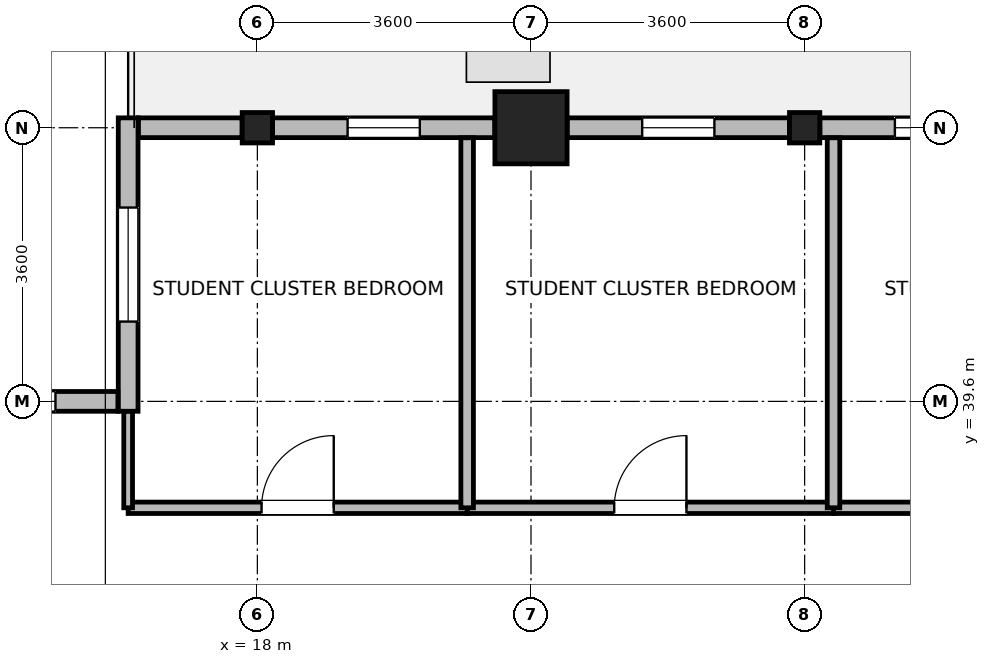
"""IFC4 building model, lengths in metres.
Left out: names, types, materials, properties, quantities, classifications, styles, units other than length and angle.
Written with IfcOpenShell. Run it as: python <this file> out.ifc"""

import sys

from ifc_helpers import new_model, si_unit, direction, frame, frame_2d, origin, origin_2d, place, context, subcontext, project, spatial, rectangle, i_section, extrude, source, transform, mapped, element, fill, save


model = new_model("IFC4")
c1 = context("Model", 3, precision=1e-05, world=origin(), true_north=direction((0.0, 1.0)))
c2 = subcontext(c1, "Body", "Model", "MODEL_VIEW")
j1 = project(units=[si_unit("LENGTHUNIT", "METRE"), si_unit("PLANEANGLEUNIT", "RADIAN")], contexts=[c1])
p1 = place(None, origin())
s1 = spatial("IfcSite", under=j1, at=p1, CompositionType="ELEMENT")
p2 = place(p1, origin())
s2 = spatial("IfcBuilding", under=s1, at=p2, CompositionType="ELEMENT")
p3 = place(p2, frame((0.0, 0.0, 231.4)))
s3 = spatial("IfcBuildingStorey", under=s2, at=p3, CompositionType="ELEMENT", Elevation=231.4)
m1 = source(origin(), c2, "Body", "SweptSolid", [
    extrude(rectangle(XDim=0.95, YDim=0.95, at=origin_2d()), origin(), (0.0, 0.0, 1.0), 3.7),
])
p4 = place(p3, frame((21.6, 43.2, 0.0), z_axis=(0.0, 0.0, 1.0), x_axis=(1.0, 0.0, 0.0)))
e1 = element("IfcColumn", 1, at=p4, inside=s3, PredefinedType="COLUMN", context=c2, shape_type="MappedRepresentation", body=[
    mapped(m1, transform((0.0, 0.0, 0.0), x_axis=(1.0, 0.0, 0.0), y_axis=(0.0, 1.0, 0.0), z_axis=(0.0, 0.0, 1.0), scale=1.0)),
])
m2 = source(origin(), c2, "Body", "SweptSolid", [
    extrude(i_section(OverallWidth=0.399, OverallDepth=0.4, WebThickness=0.017, FlangeThickness=0.023, FilletRadius=0.015, at=origin_2d()), origin(), (0.0, 0.0, 1.0), 3.7),
])
for number, where, z_axis, x_axis in (
    (2, (18.0, 43.2, 0.0), (0.0, 0.0, 1.0), (1.0, 0.0, 0.0)),
    (3, (25.2, 43.2, 0.0), (0.0, 0.0, 1.0), (1.0, 0.0, 0.0)),
):
    element("IfcColumn", number, at=place(p3, frame(where, z_axis=z_axis, x_axis=x_axis)), inside=s3, PredefinedType="COLUMN", context=c2, shape_type="MappedRepresentation", body=[
        mapped(m2, transform((0.0, 0.0, 0.0), x_axis=(1.0, 0.0, 0.0), y_axis=(0.0, 1.0, 0.0), z_axis=(0.0, 0.0, 1.0), scale=1.0)),
    ])
p5 = place(p3, frame((25.4, 43.2, 0.0), z_axis=(0.0, 0.0, 1.0), x_axis=(1.0, 0.0, 0.0)))
e4 = element("IfcWall", 4, at=p5, inside=s3, PredefinedType="STANDARD", context=c2, shape_type="SweptSolid", body=[
    extrude(rectangle(XDim=2.924, YDim=0.26, at=frame_2d((1.462, 0.0))), origin(), (0.0, 0.0, 1.0), 3.02),
])
p6 = place(p5, frame((0.987, 0.0, 0.85)))
e5 = element("IfcOpeningElement", 5, at=p6, cuts=e4, PredefinedType="OPENING", context=c2, shape_type="SweptSolid", body=[
    extrude(rectangle(XDim=0.95, YDim=1.75, at=frame_2d((0.475, 0.875))), frame((0.0, 0.14, 0.0), z_axis=(0.0, -1.0, 0.0), x_axis=(1.0, 0.0, 0.0)), (0.0, 0.0, 1.0), 0.28),
])
p7 = place(p3, frame((22.076, 43.2, 0.0), z_axis=(0.0, 0.0, 1.0), x_axis=(1.0, 0.0, 0.0)))
e6 = element("IfcWall", 6, at=p7, inside=s3, PredefinedType="STANDARD", context=c2, shape_type="SweptSolid", body=[
    extrude(rectangle(XDim=2.924, YDim=0.26, at=frame_2d((1.462, 0.0))), origin(), (0.0, 0.0, 1.0), 3.02),
])
p8 = place(p7, frame((0.987, 0.0, 0.85)))
e7 = element("IfcOpeningElement", 7, at=p8, cuts=e6, PredefinedType="OPENING", context=c2, shape_type="SweptSolid", body=[
    extrude(rectangle(XDim=0.95, YDim=1.75, at=frame_2d((0.475, 0.875))), frame((0.0, 0.14, 0.0), z_axis=(0.0, -1.0, 0.0), x_axis=(1.0, 0.0, 0.0)), (0.0, 0.0, 1.0), 0.28),
])
p9 = place(p3, frame((18.2, 43.2, 0.0), z_axis=(0.0, 0.0, 1.0), x_axis=(1.0, 0.0, 0.0)))
e8 = element("IfcWall", 8, at=p9, inside=s3, PredefinedType="STANDARD", context=c2, shape_type="SweptSolid", body=[
    extrude(rectangle(XDim=2.924, YDim=0.26, at=frame_2d((1.462, 0.0))), origin(), (0.0, 0.0, 1.0), 3.02),
])
p10 = place(p9, frame((0.987, 0.0, 0.85)))
e9 = element("IfcOpeningElement", 9, at=p10, cuts=e8, PredefinedType="OPENING", context=c2, shape_type="SweptSolid", body=[
    extrude(rectangle(XDim=0.95, YDim=1.75, at=frame_2d((0.475, 0.875))), frame((0.0, 0.14, 0.0), z_axis=(0.0, -1.0, 0.0), x_axis=(1.0, 0.0, 0.0)), (0.0, 0.0, 1.0), 0.28),
])
p11 = place(p3, frame((16.435, 43.2, 0.0), z_axis=(0.0, 0.0, 1.0), x_axis=(1.0, 0.0, 0.0)))
e10 = element("IfcWall", 10, at=p11, inside=s3, PredefinedType="STANDARD", context=c2, shape_type="SweptSolid", body=[
    extrude(rectangle(XDim=1.365, YDim=0.26, at=frame_2d((0.682, 0.0))), origin(), (0.0, 0.0, 1.0), 3.02),
])
p12 = place(p3, frame((16.3, 39.47, 0.0), z_axis=(0.0, 0.0, 1.0), x_axis=(0.0, 1.0, 0.0)))
e11 = element("IfcWall", 11, at=p12, inside=s3, PredefinedType="STANDARD", context=c2, shape_type="SweptSolid", body=[
    extrude(rectangle(XDim=3.86, YDim=0.26, at=frame_2d((1.93, 0.0))), origin(), (0.0, 0.0, 1.0), 3.42),
])
p13 = place(p12, frame((1.18, 0.0, 0.85)))
e12 = element("IfcOpeningElement", 12, at=p13, cuts=e11, PredefinedType="OPENING", context=c2, shape_type="SweptSolid", body=[
    extrude(rectangle(XDim=1.5, YDim=1.85, at=frame_2d((0.75, 0.925))), frame((0.0, 0.14, 0.0), z_axis=(0.0, -1.0, 0.0), x_axis=(1.0, 0.0, 0.0)), (0.0, 0.0, 1.0), 0.28),
])
p14 = place(p3, frame((6.737, 39.6, 0.0), z_axis=(0.0, 0.0, 1.0), x_axis=(1.0, 0.0, 0.0)))
e13 = element("IfcWall", 13, at=p14, inside=s3, PredefinedType="STANDARD", context=c2, shape_type="SweptSolid", body=[
    extrude(rectangle(XDim=9.428, YDim=0.26, at=frame_2d((4.714, 0.0))), origin(), (0.0, 0.0, 1.0), 3.42),
])
p15 = place(p14, frame((0.821, 0.0, 0.85)))
e14 = element("IfcOpeningElement", 14, at=p15, cuts=e13, PredefinedType="OPENING", context=c2, shape_type="SweptSolid", body=[
    extrude(rectangle(XDim=1.5, YDim=1.85, at=frame_2d((0.75, 0.925))), frame((0.0, 0.14, 0.0), z_axis=(0.0, -1.0, 0.0), x_axis=(1.0, 0.0, 0.0)), (0.0, 0.0, 1.0), 0.28),
])
p16 = place(p14, frame((3.964, 0.0, 0.85)))
e15 = element("IfcOpeningElement", 15, at=p16, cuts=e13, PredefinedType="OPENING", context=c2, shape_type="SweptSolid", body=[
    extrude(rectangle(XDim=1.5, YDim=1.85, at=frame_2d((0.75, 0.925))), frame((0.0, 0.14, 0.0), z_axis=(0.0, -1.0, 0.0), x_axis=(1.0, 0.0, 0.0)), (0.0, 0.0, 1.0), 0.28),
])
p17 = place(p14, frame((7.107, 0.0, 0.85)))
e16 = element("IfcOpeningElement", 16, at=p17, cuts=e13, PredefinedType="OPENING", context=c2, shape_type="SweptSolid", body=[
    extrude(rectangle(XDim=1.5, YDim=1.85, at=frame_2d((0.75, 0.925))), frame((0.0, 0.14, 0.0), z_axis=(0.0, -1.0, 0.0), x_axis=(1.0, 0.0, 0.0)), (0.0, 0.0, 1.0), 0.28),
])
p18 = place(p3, frame((25.58, 38.2, 0.0), z_axis=(0.0, 0.0, 1.0), x_axis=(1.0, 0.0, 0.0)))
e17 = element("IfcWall", 17, at=p18, inside=s3, PredefinedType="PARTITIONING", context=c2, shape_type="SweptSolid", body=[
    extrude(rectangle(XDim=5.16, YDim=0.15, at=frame_2d((2.58, 0.0))), origin(), (0.0, 0.0, 1.0), 3.42),
])
p19 = place(p18, frame((2.105, 0.0, 0.0)))
e18 = element("IfcOpeningElement", 18, at=p19, cuts=e17, PredefinedType="OPENING", context=c2, shape_type="SweptSolid", body=[
    extrude(rectangle(XDim=0.95, YDim=2.1, at=frame_2d((0.475, 1.05))), frame((0.0, 0.085, 0.0), z_axis=(0.0, -1.0, 0.0), x_axis=(1.0, 0.0, 0.0)), (0.0, 0.0, 1.0), 0.17),
])
p20 = place(p3, frame((20.76, 38.2, 0.0), z_axis=(0.0, 0.0, 1.0), x_axis=(1.0, 0.0, 0.0)))
e19 = element("IfcWall", 19, at=p20, inside=s3, PredefinedType="PARTITIONING", context=c2, shape_type="SweptSolid", body=[
    extrude(rectangle(XDim=4.82, YDim=0.15, at=frame_2d((2.41, 0.0))), origin(), (0.0, 0.0, 1.0), 3.42),
])
p21 = place(p20, frame((1.935, 0.0, 0.0)))
e20 = element("IfcOpeningElement", 20, at=p21, cuts=e19, PredefinedType="OPENING", context=c2, shape_type="SweptSolid", body=[
    extrude(rectangle(XDim=0.95, YDim=2.1, at=frame_2d((0.475, 1.05))), frame((0.0, 0.085, 0.0), z_axis=(0.0, -1.0, 0.0), x_axis=(1.0, 0.0, 0.0)), (0.0, 0.0, 1.0), 0.17),
])
p22 = place(p3, frame((16.3, 38.2, 0.0), z_axis=(0.0, 0.0, 1.0), x_axis=(1.0, 0.0, 0.0)))
e21 = element("IfcWall", 21, at=p22, inside=s3, PredefinedType="PARTITIONING", context=c2, shape_type="SweptSolid", body=[
    extrude(rectangle(XDim=4.46, YDim=0.15, at=frame_2d((2.23, 0.0))), origin(), (0.0, 0.0, 1.0), 3.42),
])
p23 = place(p22, frame((1.755, 0.0, 0.0)))
e22 = element("IfcOpeningElement", 22, at=p23, cuts=e21, PredefinedType="OPENING", context=c2, shape_type="SweptSolid", body=[
    extrude(rectangle(XDim=0.95, YDim=2.1, at=frame_2d((0.475, 1.05))), frame((0.0, 0.085, 0.0), z_axis=(0.0, -1.0, 0.0), x_axis=(1.0, 0.0, 0.0)), (0.0, 0.0, 1.0), 0.17),
])
p24 = place(p3, frame((16.3, 38.2, 0.0), z_axis=(0.0, 0.0, 1.0), x_axis=(0.0, 1.0, 0.0)))
e23 = element("IfcWall", 23, at=p24, inside=s3, PredefinedType="PARTITIONING", context=c2, shape_type="SweptSolid", body=[
    extrude(rectangle(XDim=1.268, YDim=0.115, at=frame_2d((0.634, 0.0))), origin(), (0.0, 0.0, 1.0), 3.42),
])
for number, where, z_axis, x_axis in (
    (24, (20.76, 38.2, 0.0), (0.0, 0.0, 1.0), (0.0, 1.0, 0.0)),
    (25, (25.58, 38.2, 0.0), (0.0, 0.0, 1.0), (0.0, 1.0, 0.0)),
):
    element("IfcWall", number, at=place(p3, frame(where, z_axis=z_axis, x_axis=x_axis)), inside=s3, PredefinedType="PARTITIONING", context=c2, shape_type="SweptSolid", body=[
        extrude(rectangle(XDim=4.868, YDim=0.165, at=frame_2d((2.434, 0.0))), origin(), (0.0, 0.0, 1.0), 3.42),
    ])
p25 = place(p6, origin())
e26 = element("IfcWindow", 26, at=p25, inside=s3, PartitioningType="SINGLE_PANEL", PredefinedType="WINDOW", context=c2, shape_type="SweptSolid", body=[
    extrude(rectangle(XDim=0.95, YDim=1.75, at=frame_2d((0.475, 0.875))), frame((0.0, 0.03, 0.0), z_axis=(0.0, -1.0, 0.0), x_axis=(1.0, 0.0, 0.0)), (0.0, 0.0, 1.0), 0.06),
])
fill(e5, e26)
p26 = place(p8, origin())
e27 = element("IfcWindow", 27, at=p26, inside=s3, PartitioningType="SINGLE_PANEL", PredefinedType="WINDOW", context=c2, shape_type="SweptSolid", body=[
    extrude(rectangle(XDim=0.95, YDim=1.75, at=frame_2d((0.475, 0.875))), frame((0.0, 0.03, 0.0), z_axis=(0.0, -1.0, 0.0), x_axis=(1.0, 0.0, 0.0)), (0.0, 0.0, 1.0), 0.06),
])
fill(e7, e27)
p27 = place(p10, origin())
e28 = element("IfcWindow", 28, at=p27, inside=s3, PartitioningType="SINGLE_PANEL", PredefinedType="WINDOW", context=c2, shape_type="SweptSolid", body=[
    extrude(rectangle(XDim=0.95, YDim=1.75, at=frame_2d((0.475, 0.875))), frame((0.0, 0.03, 0.0), z_axis=(0.0, -1.0, 0.0), x_axis=(1.0, 0.0, 0.0)), (0.0, 0.0, 1.0), 0.06),
])
fill(e9, e28)
p28 = place(p13, origin())
e29 = element("IfcWindow", 29, at=p28, inside=s3, PartitioningType="SINGLE_PANEL", PredefinedType="WINDOW", context=c2, shape_type="SweptSolid", body=[
    extrude(rectangle(XDim=1.5, YDim=1.85, at=frame_2d((0.75, 0.925))), frame((0.0, 0.03, 0.0), z_axis=(0.0, -1.0, 0.0), x_axis=(1.0, 0.0, 0.0)), (0.0, 0.0, 1.0), 0.06),
])
fill(e12, e29)
p29 = place(p17, origin())
e30 = element("IfcWindow", 30, at=p29, inside=s3, PartitioningType="SINGLE_PANEL", PredefinedType="WINDOW", context=c2, shape_type="SweptSolid", body=[
    extrude(rectangle(XDim=1.5, YDim=1.85, at=frame_2d((0.75, 0.925))), frame((0.0, 0.03, 0.0), z_axis=(0.0, -1.0, 0.0), x_axis=(1.0, 0.0, 0.0)), (0.0, 0.0, 1.0), 0.06),
])
fill(e16, e30)
p30 = place(p21, origin())
e31 = element("IfcDoor", 31, at=p30, inside=s3, OperationType="SINGLE_SWING_RIGHT", PredefinedType="DOOR", context=c2, shape_type="SweptSolid", body=[
    extrude(rectangle(XDim=0.95, YDim=2.1, at=frame_2d((0.475, 1.05))), frame((0.0, 0.025, 0.0), z_axis=(0.0, -1.0, 0.0), x_axis=(1.0, 0.0, 0.0)), (0.0, 0.0, 1.0), 0.05),
])
fill(e20, e31)
p31 = place(p23, origin())
e32 = element("IfcDoor", 32, at=p31, inside=s3, OperationType="SINGLE_SWING_RIGHT", PredefinedType="DOOR", context=c2, shape_type="SweptSolid", body=[
    extrude(rectangle(XDim=0.95, YDim=2.1, at=frame_2d((0.475, 1.05))), frame((0.0, 0.025, 0.0), z_axis=(0.0, -1.0, 0.0), x_axis=(1.0, 0.0, 0.0)), (0.0, 0.0, 1.0), 0.05),
])
fill(e22, e32)
save(model, sys.argv[1])
